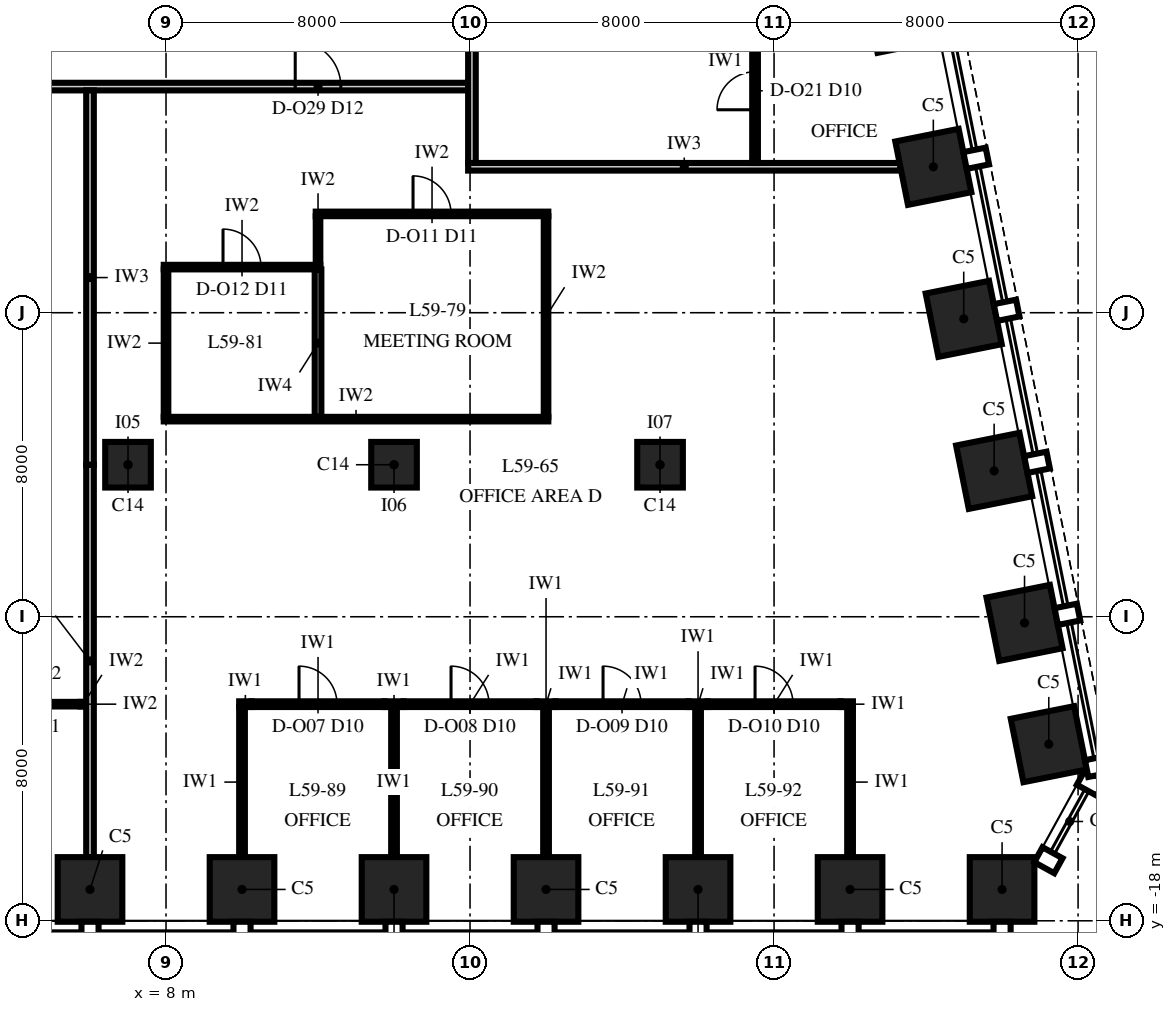
"""IFC4 building model, lengths in metres.
Left out: names, types, materials, properties, quantities, classifications, styles, units other than length and angle.
Written with IfcOpenShell. Run it as: python <this file> out.ifc"""

import sys

from ifc_helpers import new_model, si_unit, direction, frame, frame_2d, origin, origin_2d, place, context, subcontext, project, spatial, rectangle, extrude, element, fill, save


model = new_model("IFC4")
c1 = context("Model", 3, precision=1e-05, world=origin(), true_north=direction((0.0, 1.0)))
c2 = subcontext(c1, "Body", "Model", "MODEL_VIEW")
j1 = project(units=[si_unit("LENGTHUNIT", "METRE"), si_unit("PLANEANGLEUNIT", "RADIAN")], contexts=[c1])
p1 = place(None, origin())
s1 = spatial("IfcSite", under=j1, at=p1, CompositionType="ELEMENT")
p2 = place(p1, origin())
s2 = spatial("IfcBuilding", under=s1, at=p2, CompositionType="ELEMENT")
p3 = place(p2, frame((0.0, 0.0, 256.0)))
s3 = spatial("IfcBuildingStorey", under=s2, at=p3, CompositionType="ELEMENT", Elevation=256.0)
for number, where, z_axis, x_axis in (
    (1, (6.0, -17.175, 0.0), (0.0, 0.0, 1.0), (1.0, 0.0, 0.0)),
    (2, (10.0, -17.175, 0.0), (0.0, 0.0, 1.0), (1.0, 0.0, 0.0)),
    (3, (14.0, -17.175, 0.0), (0.0, 0.0, 1.0), (1.0, 0.0, 0.0)),
    (4, (18.0, -17.175, 0.0), (0.0, 0.0, 1.0), (1.0, 0.0, 0.0)),
    (5, (22.0, -17.175, 0.0), (0.0, 0.0, 1.0), (1.0, 0.0, 0.0)),
    (6, (26.0, -17.175, 0.0), (0.0, 0.0, 1.0), (1.0, 0.0, 0.0)),
):
    element("IfcColumn", number, at=place(p3, frame(where, z_axis=z_axis, x_axis=x_axis)), inside=s3, PredefinedType="COLUMN", context=c2, shape_type="SweptSolid", body=[
        extrude(rectangle(XDim=1.7, YDim=1.7, at=origin_2d()), origin(), (0.0, 0.0, 1.0), 3.75),
    ])
p4 = place(p3, frame((30.0, -17.175, 0.0), z_axis=(0.0, 0.0, 1.0), x_axis=(1.0, 0.0, 0.0)))
e7 = element("IfcColumn", 7, at=p4, inside=s3, PredefinedType="COLUMN", context=c2, shape_type="SweptSolid", body=[
    extrude(rectangle(XDim=1.7, YDim=1.7, at=origin_2d()), origin(), (0.0, 0.0, 1.0), 4.0),
])
p5 = place(p3, frame((31.229, -13.353, 0.0), z_axis=(0.0, 0.0, 1.0), x_axis=(-0.196116135138, 0.980580675691, 0.0)))
e8 = element("IfcColumn", 8, at=p5, inside=s3, PredefinedType="COLUMN", context=c2, shape_type="SweptSolid", body=[
    extrude(rectangle(XDim=1.7, YDim=1.7, at=origin_2d()), origin(), (0.0, 0.0, 1.0), 3.75),
])
for number, where, z_axis, x_axis in (
    (9, (30.591, -10.162, 0.0), (0.0, 0.0, 1.0), (-0.196, 0.981, 0.0)),
    (10, (29.791, -6.162, 0.0), (0.0, 0.0, 1.0), (-0.196, 0.981, 0.0)),
    (11, (28.991, -2.162, 0.0), (0.0, 0.0, 1.0), (-0.196, 0.981, 0.0)),
    (12, (28.191, 1.838, 0.0), (0.0, 0.0, 1.0), (-0.196, 0.981, 0.0)),
    (13, (27.391, 5.838, 0.0), (0.0, 0.0, 1.0), (-0.196, 0.981, 0.0)),
):
    element("IfcColumn", number, at=place(p3, frame(where, z_axis=z_axis, x_axis=x_axis)), inside=s3, PredefinedType="COLUMN", context=c2, shape_type="SweptSolid", body=[
        extrude(rectangle(XDim=1.7, YDim=1.7, at=origin_2d()), origin(), (0.0, 0.0, 1.0), 4.0),
    ])
for number, where, z_axis, x_axis in (
    (14, (7.0, -6.0, 0.0), (0.0, 0.0, 1.0), (1.0, 0.0, 0.0)),
    (15, (14.0, -6.0, 0.0), (0.0, 0.0, 1.0), (1.0, 0.0, 0.0)),
    (16, (21.0, -6.0, 0.0), (0.0, 0.0, 1.0), (1.0, 0.0, 0.0)),
):
    element("IfcColumn", number, at=place(p3, frame(where, z_axis=z_axis, x_axis=x_axis)), inside=s3, PredefinedType="COLUMN", context=c2, shape_type="SweptSolid", body=[
        extrude(rectangle(XDim=1.2, YDim=1.2, at=origin_2d()), origin(), (0.0, 0.0, 1.0), 4.0),
    ])
p6 = place(p3, frame((2.25, -12.3, 0.0), z_axis=(0.0, 0.0, 1.0), x_axis=(1.0, 0.0, 0.0)))
e17 = element("IfcWall", 17, at=p6, inside=s3, PredefinedType="PARTITIONING", context=c2, shape_type="SweptSolid", body=[
    extrude(rectangle(XDim=3.5, YDim=0.12, at=frame_2d((1.75, 0.0))), origin(), (0.0, 0.0, 1.0), 3.85),
])
p7 = place(p6, frame((1.25, 0.0, 0.0)))
e18 = element("IfcOpeningElement", 18, at=p7, cuts=e17, PredefinedType="OPENING", context=c2, shape_type="SweptSolid", body=[
    extrude(rectangle(XDim=1.0, YDim=2.4, at=frame_2d((0.5, 1.2))), frame((0.0, 0.075, 0.0), z_axis=(0.0, -1.0, 0.0), x_axis=(1.0, 0.0, 0.0)), (0.0, 0.0, 1.0), 0.15),
])
p8 = place(p3, frame((5.75, -12.3, 0.0), z_axis=(0.0, 0.0, 1.0), x_axis=(1.0, 0.0, 0.0)))
e19 = element("IfcWall", 19, at=p8, inside=s3, PredefinedType="PARTITIONING", context=c2, shape_type="SweptSolid", body=[
    extrude(rectangle(XDim=0.15, YDim=0.12, at=frame_2d((0.075, 0.0))), origin(), (0.0, 0.0, 1.0), 2.15),
])
p9 = place(p3, frame((9.925, -12.3, 0.0), z_axis=(0.0, 0.0, 1.0), x_axis=(1.0, 0.0, 0.0)))
e20 = element("IfcWall", 20, at=p9, inside=s3, PredefinedType="PARTITIONING", context=c2, shape_type="SweptSolid", body=[
    extrude(rectangle(XDim=0.325, YDim=0.15, at=frame_2d((0.163, 0.0))), origin(), (0.0, 0.0, 1.0), 2.15),
])
p10 = place(p3, frame((10.25, -12.3, 0.0), z_axis=(0.0, 0.0, 1.0), x_axis=(1.0, 0.0, 0.0)))
e21 = element("IfcWall", 21, at=p10, inside=s3, PredefinedType="PARTITIONING", context=c2, shape_type="SweptSolid", body=[
    extrude(rectangle(XDim=3.5, YDim=0.15, at=frame_2d((1.75, 0.0))), origin(), (0.0, 0.0, 1.0), 3.85),
])
p11 = place(p10, frame((1.25, 0.0, 0.0)))
e22 = element("IfcOpeningElement", 22, at=p11, cuts=e21, PredefinedType="OPENING", context=c2, shape_type="SweptSolid", body=[
    extrude(rectangle(XDim=1.0, YDim=2.3, at=frame_2d((0.5, 1.15))), frame((0.0, 0.09, 0.0), z_axis=(0.0, -1.0, 0.0), x_axis=(1.0, 0.0, 0.0)), (0.0, 0.0, 1.0), 0.18),
])
p12 = place(p3, frame((13.75, -12.3, 0.0), z_axis=(0.0, 0.0, 1.0), x_axis=(1.0, 0.0, 0.0)))
e23 = element("IfcWall", 23, at=p12, inside=s3, PredefinedType="PARTITIONING", context=c2, shape_type="SweptSolid", body=[
    extrude(rectangle(XDim=0.5, YDim=0.15, at=frame_2d((0.25, 0.0))), origin(), (0.0, 0.0, 1.0), 2.15),
])
p13 = place(p3, frame((14.25, -12.3, 0.0), z_axis=(0.0, 0.0, 1.0), x_axis=(1.0, 0.0, 0.0)))
e24 = element("IfcWall", 24, at=p13, inside=s3, PredefinedType="PARTITIONING", context=c2, shape_type="SweptSolid", body=[
    extrude(rectangle(XDim=3.5, YDim=0.15, at=frame_2d((1.75, 0.0))), origin(), (0.0, 0.0, 1.0), 3.85),
])
p14 = place(p13, frame((1.25, 0.0, 0.0)))
e25 = element("IfcOpeningElement", 25, at=p14, cuts=e24, PredefinedType="OPENING", context=c2, shape_type="SweptSolid", body=[
    extrude(rectangle(XDim=1.0, YDim=2.3, at=frame_2d((0.5, 1.15))), frame((0.0, 0.09, 0.0), z_axis=(0.0, -1.0, 0.0), x_axis=(1.0, 0.0, 0.0)), (0.0, 0.0, 1.0), 0.18),
])
p15 = place(p3, frame((17.75, -12.3, 0.0), z_axis=(0.0, 0.0, 1.0), x_axis=(1.0, 0.0, 0.0)))
e26 = element("IfcWall", 26, at=p15, inside=s3, PredefinedType="PARTITIONING", context=c2, shape_type="SweptSolid", body=[
    extrude(rectangle(XDim=0.5, YDim=0.15, at=frame_2d((0.25, 0.0))), origin(), (0.0, 0.0, 1.0), 2.15),
])
p16 = place(p3, frame((18.25, -12.3, 0.0), z_axis=(0.0, 0.0, 1.0), x_axis=(1.0, 0.0, 0.0)))
e27 = element("IfcWall", 27, at=p16, inside=s3, PredefinedType="PARTITIONING", context=c2, shape_type="SweptSolid", body=[
    extrude(rectangle(XDim=3.5, YDim=0.15, at=frame_2d((1.75, 0.0))), origin(), (0.0, 0.0, 1.0), 3.85),
])
p17 = place(p16, frame((1.25, 0.0, 0.0)))
e28 = element("IfcOpeningElement", 28, at=p17, cuts=e27, PredefinedType="OPENING", context=c2, shape_type="SweptSolid", body=[
    extrude(rectangle(XDim=1.0, YDim=2.3, at=frame_2d((0.5, 1.15))), frame((0.0, 0.09, 0.0), z_axis=(0.0, -1.0, 0.0), x_axis=(1.0, 0.0, 0.0)), (0.0, 0.0, 1.0), 0.18),
])
p18 = place(p3, frame((21.75, -12.3, 0.0), z_axis=(0.0, 0.0, 1.0), x_axis=(1.0, 0.0, 0.0)))
e29 = element("IfcWall", 29, at=p18, inside=s3, PredefinedType="PARTITIONING", context=c2, shape_type="SweptSolid", body=[
    extrude(rectangle(XDim=0.5, YDim=0.15, at=frame_2d((0.25, 0.0))), origin(), (0.0, 0.0, 1.0), 2.15),
])
p19 = place(p3, frame((22.25, -12.3, 0.0), z_axis=(0.0, 0.0, 1.0), x_axis=(1.0, 0.0, 0.0)))
e30 = element("IfcWall", 30, at=p19, inside=s3, PredefinedType="PARTITIONING", context=c2, shape_type="SweptSolid", body=[
    extrude(rectangle(XDim=3.5, YDim=0.15, at=frame_2d((1.75, 0.0))), origin(), (0.0, 0.0, 1.0), 3.85),
])
p20 = place(p19, frame((1.25, 0.0, 0.0)))
e31 = element("IfcOpeningElement", 31, at=p20, cuts=e30, PredefinedType="OPENING", context=c2, shape_type="SweptSolid", body=[
    extrude(rectangle(XDim=1.0, YDim=2.3, at=frame_2d((0.5, 1.15))), frame((0.0, 0.09, 0.0), z_axis=(0.0, -1.0, 0.0), x_axis=(1.0, 0.0, 0.0)), (0.0, 0.0, 1.0), 0.18),
])
p21 = place(p3, frame((25.75, -12.3, 0.0), z_axis=(0.0, 0.0, 1.0), x_axis=(1.0, 0.0, 0.0)))
e32 = element("IfcWall", 32, at=p21, inside=s3, PredefinedType="PARTITIONING", context=c2, shape_type="SweptSolid", body=[
    extrude(rectangle(XDim=0.325, YDim=0.15, at=frame_2d((0.163, 0.0))), origin(), (0.0, 0.0, 1.0), 2.15),
])
p22 = place(p3, frame((7.94, -4.8, 0.0), z_axis=(0.0, 0.0, 1.0), x_axis=(1.0, 0.0, 0.0)))
e33 = element("IfcWall", 33, at=p22, inside=s3, PredefinedType="PARTITIONING", context=c2, shape_type="SweptSolid", body=[
    extrude(rectangle(XDim=10.12, YDim=0.12, at=frame_2d((5.06, 0.0))), origin(), (0.0, 0.0, 1.0), 3.23),
])
p23 = place(p3, frame((7.94, -0.8, 0.0), z_axis=(0.0, 0.0, 1.0), x_axis=(1.0, 0.0, 0.0)))
e34 = element("IfcWall", 34, at=p23, inside=s3, PredefinedType="PARTITIONING", context=c2, shape_type="SweptSolid", body=[
    extrude(rectangle(XDim=4.12, YDim=0.12, at=frame_2d((2.06, 0.0))), origin(), (0.0, 0.0, 1.0), 3.23),
])
p24 = place(p23, frame((1.56, 0.0, 0.0)))
e35 = element("IfcOpeningElement", 35, at=p24, cuts=e34, PredefinedType="OPENING", context=c2, shape_type="SweptSolid", body=[
    extrude(rectangle(XDim=1.0, YDim=2.4, at=frame_2d((0.5, 1.2))), frame((0.0, 0.075, 0.0), z_axis=(0.0, -1.0, 0.0), x_axis=(1.0, 0.0, 0.0)), (0.0, 0.0, 1.0), 0.15),
])
p25 = place(p3, frame((11.94, 0.6, 0.0), z_axis=(0.0, 0.0, 1.0), x_axis=(1.0, 0.0, 0.0)))
e36 = element("IfcWall", 36, at=p25, inside=s3, PredefinedType="PARTITIONING", context=c2, shape_type="SweptSolid", body=[
    extrude(rectangle(XDim=6.12, YDim=0.12, at=frame_2d((3.06, 0.0))), origin(), (0.0, 0.0, 1.0), 3.23),
])
p26 = place(p25, frame((2.56, 0.0, 0.0)))
e37 = element("IfcOpeningElement", 37, at=p26, cuts=e36, PredefinedType="OPENING", context=c2, shape_type="SweptSolid", body=[
    extrude(rectangle(XDim=1.0, YDim=2.4, at=frame_2d((0.5, 1.2))), frame((0.0, 0.075, 0.0), z_axis=(0.0, -1.0, 0.0), x_axis=(1.0, 0.0, 0.0)), (0.0, 0.0, 1.0), 0.15),
])
p27 = place(p3, frame((15.95, 1.84, 0.0), z_axis=(0.0, 0.0, 1.0), x_axis=(1.0, 0.0, 0.0)))
e38 = element("IfcWall", 38, at=p27, inside=s3, PredefinedType="PARTITIONING", context=c2, shape_type="SweptSolid", body=[
    extrude(rectangle(XDim=11.374, YDim=0.2, at=frame_2d((5.687, 0.0))), origin(), (0.0, 0.0, 1.0), 3.23),
])
p28 = place(p3, frame((-15.95, 3.95, 0.0), z_axis=(0.0, 0.0, 1.0), x_axis=(1.0, 0.0, 0.0)))
e39 = element("IfcWall", 39, at=p28, inside=s3, PredefinedType="PARTITIONING", context=c2, shape_type="SweptSolid", body=[
    extrude(rectangle(XDim=31.9, YDim=0.2, at=frame_2d((15.95, 0.0))), origin(), (0.0, 0.0, 1.0), 3.23),
])
p29 = place(p28, frame((3.35, 0.0, 0.0)))
e40 = element("IfcOpeningElement", 40, at=p29, cuts=e39, PredefinedType="OPENING", context=c2, shape_type="SweptSolid", body=[
    extrude(rectangle(XDim=1.2, YDim=2.4, at=frame_2d((0.6, 1.2))), frame((0.0, 0.115, 0.0), z_axis=(0.0, -1.0, 0.0), x_axis=(1.0, 0.0, 0.0)), (0.0, 0.0, 1.0), 0.23),
])
p30 = place(p28, frame((27.35, 0.0, 0.0)))
e41 = element("IfcOpeningElement", 41, at=p30, cuts=e39, PredefinedType="OPENING", context=c2, shape_type="SweptSolid", body=[
    extrude(rectangle(XDim=1.2, YDim=2.4, at=frame_2d((0.6, 1.2))), frame((0.0, 0.115, 0.0), z_axis=(0.0, -1.0, 0.0), x_axis=(1.0, 0.0, 0.0)), (0.0, 0.0, 1.0), 0.23),
])
p31 = place(p28, frame((15.35, 0.0, 0.0)))
e42 = element("IfcOpeningElement", 42, at=p31, cuts=e39, PredefinedType="OPENING", context=c2, shape_type="SweptSolid", body=[
    extrude(rectangle(XDim=1.2, YDim=2.4, at=frame_2d((0.6, 1.2))), frame((0.0, 0.115, 0.0), z_axis=(0.0, -1.0, 0.0), x_axis=(1.0, 0.0, 0.0)), (0.0, 0.0, 1.0), 0.23),
])
p32 = place(p3, frame((6.0, -16.325, 0.0), z_axis=(0.0, 0.0, 1.0), x_axis=(0.0, 1.0, 0.0)))
e43 = element("IfcWall", 43, at=p32, inside=s3, PredefinedType="PARTITIONING", context=c2, shape_type="SweptSolid", body=[
    extrude(rectangle(XDim=10.325, YDim=0.2, at=frame_2d((5.163, 0.0))), origin(), (0.0, 0.0, 1.0), 2.15),
])
p33 = place(p3, frame((6.0, -6.0, 0.0), z_axis=(0.0, 0.0, 1.0), x_axis=(0.0, 1.0, 0.0)))
e44 = element("IfcWall", 44, at=p33, inside=s3, PredefinedType="PARTITIONING", context=c2, shape_type="SweptSolid", body=[
    extrude(rectangle(XDim=9.85, YDim=0.2, at=frame_2d((4.925, 0.0))), origin(), (0.0, 0.0, 1.0), 2.85),
])
p34 = place(p3, frame((8.0, -4.74, 0.0), z_axis=(0.0, 0.0, 1.0), x_axis=(0.0, 1.0, 0.0)))
e45 = element("IfcWall", 45, at=p34, inside=s3, PredefinedType="PARTITIONING", context=c2, shape_type="SweptSolid", body=[
    extrude(rectangle(XDim=3.88, YDim=0.12, at=frame_2d((1.94, 0.0))), origin(), (0.0, 0.0, 1.0), 3.85),
])
p35 = place(p3, frame((10.0, -16.325, 0.0), z_axis=(0.0, 0.0, 1.0), x_axis=(0.0, 1.0, 0.0)))
e46 = element("IfcWall", 46, at=p35, inside=s3, PredefinedType="PARTITIONING", context=c2, shape_type="SweptSolid", body=[
    extrude(rectangle(XDim=3.95, YDim=0.15, at=frame_2d((1.975, 0.0))), origin(), (0.0, 0.0, 1.0), 2.15),
])
p36 = place(p3, frame((12.0, -4.74, 0.0), z_axis=(0.0, 0.0, 1.0), x_axis=(0.0, 1.0, 0.0)))
e47 = element("IfcWall", 47, at=p36, inside=s3, PredefinedType="PARTITIONING", context=c2, shape_type="SweptSolid", body=[
    extrude(rectangle(XDim=3.88, YDim=0.175, at=frame_2d((1.94, 0.0))), origin(), (0.0, 0.0, 1.0), 3.85),
])
p37 = place(p3, frame((12.0, -0.74, 0.0), z_axis=(0.0, 0.0, 1.0), x_axis=(0.0, 1.0, 0.0)))
e48 = element("IfcWall", 48, at=p37, inside=s3, PredefinedType="PARTITIONING", context=c2, shape_type="SweptSolid", body=[
    extrude(rectangle(XDim=1.28, YDim=0.12, at=frame_2d((0.64, 0.0))), origin(), (0.0, 0.0, 1.0), 3.85),
])
p38 = place(p3, frame((14.0, -16.325, 0.0), z_axis=(0.0, 0.0, 1.0), x_axis=(0.0, 1.0, 0.0)))
e49 = element("IfcWall", 49, at=p38, inside=s3, PredefinedType="PARTITIONING", context=c2, shape_type="SweptSolid", body=[
    extrude(rectangle(XDim=3.95, YDim=0.15, at=frame_2d((1.975, 0.0))), origin(), (0.0, 0.0, 1.0), 2.15),
])
p39 = place(p3, frame((16.05, 1.94, 0.0), z_axis=(0.0, 0.0, 1.0), x_axis=(0.0, 1.0, 0.0)))
e50 = element("IfcWall", 50, at=p39, inside=s3, PredefinedType="PARTITIONING", context=c2, shape_type="SweptSolid", body=[
    extrude(rectangle(XDim=24.01, YDim=0.2, at=frame_2d((12.005, 0.0))), origin(), (0.0, 0.0, 1.0), 2.842),
])
p40 = place(p39, frame((8.46, 0.0, 0.0)))
e51 = element("IfcOpeningElement", 51, at=p40, cuts=e50, PredefinedType="OPENING", context=c2, shape_type="SweptSolid", body=[
    extrude(rectangle(XDim=1.2, YDim=2.4, at=frame_2d((0.6, 1.2))), frame((0.0, 0.115, 0.0), z_axis=(0.0, -1.0, 0.0), x_axis=(1.0, 0.0, 0.0)), (0.0, 0.0, 1.0), 0.23),
])
p41 = place(p3, frame((18.0, -16.325, 0.0), z_axis=(0.0, 0.0, 1.0), x_axis=(0.0, 1.0, 0.0)))
e52 = element("IfcWall", 52, at=p41, inside=s3, PredefinedType="PARTITIONING", context=c2, shape_type="SweptSolid", body=[
    extrude(rectangle(XDim=3.95, YDim=0.15, at=frame_2d((1.975, 0.0))), origin(), (0.0, 0.0, 1.0), 2.15),
])
p42 = place(p3, frame((18.0, -4.74, 0.0), z_axis=(0.0, 0.0, 1.0), x_axis=(0.0, 1.0, 0.0)))
e53 = element("IfcWall", 53, at=p42, inside=s3, PredefinedType="PARTITIONING", context=c2, shape_type="SweptSolid", body=[
    extrude(rectangle(XDim=5.28, YDim=0.12, at=frame_2d((2.64, 0.0))), origin(), (0.0, 0.0, 1.0), 3.23),
])
p43 = place(p3, frame((22.0, -16.325, 0.0), z_axis=(0.0, 0.0, 1.0), x_axis=(0.0, 1.0, 0.0)))
e54 = element("IfcWall", 54, at=p43, inside=s3, PredefinedType="PARTITIONING", context=c2, shape_type="SweptSolid", body=[
    extrude(rectangle(XDim=3.95, YDim=0.15, at=frame_2d((1.975, 0.0))), origin(), (0.0, 0.0, 1.0), 2.15),
])
p44 = place(p3, frame((23.5, 1.94, 0.0), z_axis=(0.0, 0.0, 1.0), x_axis=(0.0, 1.0, 0.0)))
e55 = element("IfcWall", 55, at=p44, inside=s3, PredefinedType="PARTITIONING", context=c2, shape_type="SweptSolid", body=[
    extrude(rectangle(XDim=3.825, YDim=0.15, at=frame_2d((1.913, 0.0))), origin(), (0.0, 0.0, 1.0), 3.85),
])
p45 = place(p44, frame((1.4, 0.0, 0.0)))
e56 = element("IfcOpeningElement", 56, at=p45, cuts=e55, PredefinedType="OPENING", context=c2, shape_type="SweptSolid", body=[
    extrude(rectangle(XDim=1.0, YDim=2.3, at=frame_2d((0.5, 1.15))), frame((0.0, 0.09, 0.0), z_axis=(0.0, -1.0, 0.0), x_axis=(1.0, 0.0, 0.0)), (0.0, 0.0, 1.0), 0.18),
])
p46 = place(p3, frame((26.0, -16.325, 0.0), z_axis=(0.0, 0.0, 1.0), x_axis=(0.0, 1.0, 0.0)))
e57 = element("IfcWall", 57, at=p46, inside=s3, PredefinedType="PARTITIONING", context=c2, shape_type="SweptSolid", body=[
    extrude(rectangle(XDim=3.95, YDim=0.15, at=frame_2d((1.975, 0.0))), origin(), (0.0, 0.0, 1.0), 2.15),
])
p47 = place(p11, origin())
e58 = element("IfcDoor", 58, at=p47, inside=s3, OperationType="SINGLE_SWING_LEFT", PredefinedType="DOOR", context=c2, shape_type="SweptSolid", body=[
    extrude(rectangle(XDim=1.0, YDim=2.3, at=frame_2d((0.5, 1.15))), frame((0.0, 0.075, 0.0), z_axis=(0.0, -1.0, 0.0), x_axis=(1.0, 0.0, 0.0)), (0.0, 0.0, 1.0), 0.149),
])
fill(e22, e58)
p48 = place(p14, origin())
e59 = element("IfcDoor", 59, at=p48, inside=s3, OperationType="SINGLE_SWING_LEFT", PredefinedType="DOOR", context=c2, shape_type="SweptSolid", body=[
    extrude(rectangle(XDim=1.0, YDim=2.3, at=frame_2d((0.5, 1.15))), frame((0.0, 0.075, 0.0), z_axis=(0.0, -1.0, 0.0), x_axis=(1.0, 0.0, 0.0)), (0.0, 0.0, 1.0), 0.149),
])
fill(e25, e59)
p49 = place(p17, origin())
e60 = element("IfcDoor", 60, at=p49, inside=s3, OperationType="SINGLE_SWING_LEFT", PredefinedType="DOOR", context=c2, shape_type="SweptSolid", body=[
    extrude(rectangle(XDim=1.0, YDim=2.3, at=frame_2d((0.5, 1.15))), frame((0.0, 0.075, 0.0), z_axis=(0.0, -1.0, 0.0), x_axis=(1.0, 0.0, 0.0)), (0.0, 0.0, 1.0), 0.149),
])
fill(e28, e60)
p50 = place(p20, origin())
e61 = element("IfcDoor", 61, at=p50, inside=s3, OperationType="SINGLE_SWING_LEFT", PredefinedType="DOOR", context=c2, shape_type="SweptSolid", body=[
    extrude(rectangle(XDim=1.0, YDim=2.3, at=frame_2d((0.5, 1.15))), frame((0.0, 0.075, 0.0), z_axis=(0.0, -1.0, 0.0), x_axis=(1.0, 0.0, 0.0)), (0.0, 0.0, 1.0), 0.149),
])
fill(e31, e61)
p51 = place(p26, origin())
e62 = element("IfcDoor", 62, at=p51, inside=s3, OperationType="SINGLE_SWING_RIGHT", PredefinedType="DOOR", context=c2, shape_type="SweptSolid", body=[
    extrude(rectangle(XDim=1.0, YDim=2.4, at=frame_2d((0.5, 1.2))), frame((0.0, 0.06, 0.0), z_axis=(0.0, -1.0, 0.0), x_axis=(1.0, 0.0, 0.0)), (0.0, 0.0, 1.0), 0.12),
])
fill(e37, e62)
p52 = place(p24, origin())
e63 = element("IfcDoor", 63, at=p52, inside=s3, OperationType="SINGLE_SWING_RIGHT", PredefinedType="DOOR", context=c2, shape_type="SweptSolid", body=[
    extrude(rectangle(XDim=1.0, YDim=2.4, at=frame_2d((0.5, 1.2))), frame((0.0, 0.06, 0.0), z_axis=(0.0, -1.0, 0.0), x_axis=(1.0, 0.0, 0.0)), (0.0, 0.0, 1.0), 0.12),
])
fill(e35, e63)
p53 = place(p45, origin())
e64 = element("IfcDoor", 64, at=p53, inside=s3, OperationType="SINGLE_SWING_LEFT", PredefinedType="DOOR", context=c2, shape_type="SweptSolid", body=[
    extrude(rectangle(XDim=1.0, YDim=2.3, at=frame_2d((0.5, 1.15))), frame((0.0, 0.075, 0.0), z_axis=(0.0, -1.0, 0.0), x_axis=(1.0, 0.0, 0.0)), (0.0, 0.0, 1.0), 0.149),
])
fill(e56, e64)
p54 = place(p30, origin())
e65 = element("IfcDoor", 65, at=p54, inside=s3, OperationType="SINGLE_SWING_LEFT", PredefinedType="DOOR", context=c2, shape_type="SweptSolid", body=[
    extrude(rectangle(XDim=1.2, YDim=2.4, at=frame_2d((0.6, 1.2))), frame((0.0, 0.1, 0.0), z_axis=(0.0, -1.0, 0.0), x_axis=(1.0, 0.0, 0.0)), (0.0, 0.0, 1.0), 0.199),
])
fill(e41, e65)
save(model, sys.argv[1])
